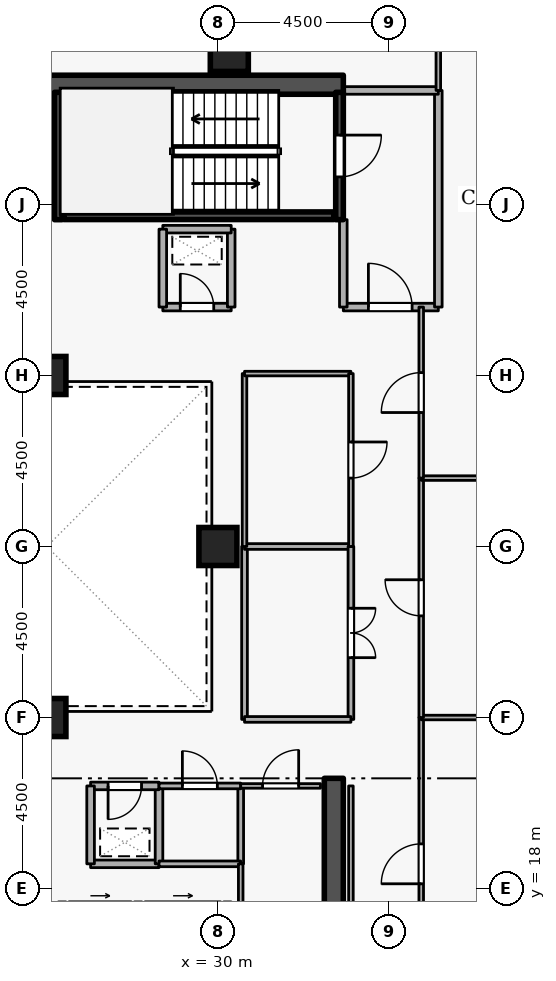
"""IFC4 building model, lengths in metres.
Left out: names, types, materials, properties, quantities, classifications, styles, units other than length and angle.
Written with IfcOpenShell. Run it as: python <this file> out.ifc"""

import sys

from ifc_helpers import new_model, si_unit, direction, frame, frame_2d, origin, origin_2d, place, context, subcontext, project, spatial, rectangle, extrude, element, fill, save


model = new_model("IFC4")
c1 = context("Model", 3, precision=1e-05, world=origin(), true_north=direction((0.0, 1.0)))
c2 = subcontext(c1, "Body", "Model", "MODEL_VIEW")
j1 = project(units=[si_unit("LENGTHUNIT", "METRE"), si_unit("PLANEANGLEUNIT", "RADIAN")], contexts=[c1])
p1 = place(None, origin())
s1 = spatial("IfcSite", under=j1, at=p1, CompositionType="ELEMENT")
p2 = place(p1, origin())
s2 = spatial("IfcBuilding", under=s1, at=p2, CompositionType="ELEMENT")
p3 = place(p2, frame((0.0, 0.0, 243.9)))
s3 = spatial("IfcBuildingStorey", under=s2, at=p3, CompositionType="ELEMENT", Elevation=243.9)
p4 = place(p3, frame((33.05, 15.1, 0.0), z_axis=(0.0, 0.0, 1.0), x_axis=(0.0, 1.0, 0.0)))
e1 = element("IfcWall", 1, at=p4, inside=s3, PredefinedType="SHEAR", context=c2, shape_type="SweptSolid", body=[
    extrude(rectangle(XDim=5.8, YDim=0.5, at=frame_2d((2.9, 0.0))), origin(), (0.0, 0.0, 1.0), 3.6),
])
p5 = place(p3, frame((17.7, 39.15, 0.0), z_axis=(0.0, 0.0, 1.0), x_axis=(1.0, 0.0, 0.0)))
e2 = element("IfcWall", 2, at=p5, inside=s3, PredefinedType="SHEAR", context=c2, shape_type="SweptSolid", body=[
    extrude(rectangle(XDim=15.6, YDim=0.5, at=frame_2d((7.8, 0.0))), origin(), (0.0, 0.0, 1.0), 3.6),
])
for number, where, z_axis, x_axis in (
    (3, (30.3, 40.0, 0.0), (0.0, 0.0, 1.0), (1.0, 0.0, 0.0)),
    (4, (25.5, 22.5, 0.0), (0.0, 0.0, 1.0), (1.0, 0.0, 0.0)),
    (5, (25.5, 31.5, 0.0), (0.0, 0.0, 1.0), (1.0, 0.0, 0.0)),
    (6, (30.0, 27.0, 0.0), (0.0, 0.0, 1.0), (1.0, 0.0, 0.0)),
):
    element("IfcColumn", number, at=place(p3, frame(where, z_axis=z_axis, x_axis=x_axis)), inside=s3, PredefinedType="COLUMN", context=c2, shape_type="SweptSolid", body=[
        extrude(rectangle(XDim=1.0, YDim=1.0, at=origin_2d()), origin(), (0.0, 0.0, 1.0), 3.6),
    ])
p6 = place(p3, frame((26.08, 17.55, 0.0), z_axis=(0.0, 0.0, 1.0), x_axis=(1.0, 0.0, 0.0)))
e7 = element("IfcWall", 7, at=p6, inside=s3, PredefinedType="STANDARD", context=c2, shape_type="SweptSolid", body=[
    extrude(rectangle(XDim=1.64, YDim=0.2, at=frame_2d((0.82, 0.0))), origin(), (0.0, 0.0, 1.0), 3.34),
])
p7 = place(p6, frame((0.31, 0.0, 0.0)))
e8 = element("IfcOpeningElement", 8, at=p7, cuts=e7, PredefinedType="OPENING", context=c2, shape_type="SweptSolid", body=[
    extrude(rectangle(XDim=1.02, YDim=2.06, at=frame_2d((0.51, 1.03))), frame((0.0, 0.11, 0.0), z_axis=(0.0, -1.0, 0.0), x_axis=(1.0, 0.0, 0.0)), (0.0, 0.0, 1.0), 0.22),
])
p8 = place(p3, frame((28.08, 17.55, 0.0), z_axis=(0.0, 0.0, 1.0), x_axis=(1.0, 0.0, 0.0)))
e9 = element("IfcWall", 9, at=p8, inside=s3, PredefinedType="STANDARD", context=c2, shape_type="SweptSolid", body=[
    extrude(rectangle(XDim=1.99, YDim=0.2, at=frame_2d((0.995, 0.0))), origin(), (0.0, 0.0, 1.0), 3.34),
])
p9 = place(p8, frame((0.485, 0.0, 0.0)))
e10 = element("IfcOpeningElement", 10, at=p9, cuts=e9, PredefinedType="OPENING", context=c2, shape_type="SweptSolid", body=[
    extrude(rectangle(XDim=1.02, YDim=2.06, at=frame_2d((0.51, 1.03))), frame((0.0, 0.11, 0.0), z_axis=(0.0, -1.0, 0.0), x_axis=(1.0, 0.0, 0.0)), (0.0, 0.0, 1.0), 0.22),
])
p10 = place(p3, frame((33.2, 38.95, 0.0), z_axis=(0.0, 0.0, 1.0), x_axis=(0.0, -1.0, 0.0)))
e11 = element("IfcWall", 11, at=p10, inside=s3, PredefinedType="SHEAR", context=c2, shape_type="SweptSolid", body=[
    extrude(rectangle(XDim=3.35, YDim=0.2, at=frame_2d((1.675, 0.0))), origin(), (0.0, 0.0, 1.0), 3.6),
])
p11 = place(p10, frame((1.125, 0.0, 0.0)))
e12 = element("IfcOpeningElement", 12, at=p11, cuts=e11, PredefinedType="OPENING", context=c2, shape_type="SweptSolid", body=[
    extrude(rectangle(XDim=1.1, YDim=2.1, at=frame_2d((0.55, 1.05))), frame((0.0, 0.11, 0.0), z_axis=(0.0, -1.0, 0.0), x_axis=(1.0, 0.0, 0.0)), (0.0, 0.0, 1.0), 0.22),
])
p12 = place(p3, frame((25.8, 35.6, 0.0), z_axis=(0.0, 0.0, 1.0), x_axis=(0.0, 1.0, 0.0)))
e13 = element("IfcWall", 13, at=p12, inside=s3, PredefinedType="SHEAR", context=c2, shape_type="SweptSolid", body=[
    extrude(rectangle(XDim=3.35, YDim=0.2, at=frame_2d((1.675, 0.0))), origin(), (0.0, 0.0, 1.0), 3.6),
])
p13 = place(p3, frame((25.95, 35.703, 0.0), z_axis=(0.0, 0.0, 1.0), x_axis=(1.0, 0.0, 0.0)))
e14 = element("IfcWall", 14, at=p13, inside=s3, PredefinedType="SHEAR", context=c2, shape_type="SweptSolid", body=[
    extrude(rectangle(XDim=7.1, YDim=0.2, at=frame_2d((3.55, 0.0))), origin(), (0.0, 0.0, 1.0), 3.6),
])
p14 = place(p3, frame((33.3, 33.3, 0.0), z_axis=(0.0, 0.0, 1.0), x_axis=(1.0, 0.0, 0.0)))
e15 = element("IfcWall", 15, at=p14, inside=s3, PredefinedType="STANDARD", context=c2, shape_type="SweptSolid", body=[
    extrude(rectangle(XDim=2.5, YDim=0.2, at=frame_2d((1.25, 0.0))), origin(), (0.0, 0.0, 1.0), 3.34),
])
p15 = place(p14, frame((0.66, 0.0, 0.0)))
e16 = element("IfcOpeningElement", 16, at=p15, cuts=e15, PredefinedType="OPENING", context=c2, shape_type="SweptSolid", body=[
    extrude(rectangle(XDim=1.15, YDim=2.1, at=frame_2d((0.575, 1.05))), frame((0.0, 0.11, 0.0), z_axis=(0.0, -1.0, 0.0), x_axis=(1.0, 0.0, 0.0)), (0.0, 0.0, 1.0), 0.22),
])
p16 = place(p3, frame((35.8, 33.3, 0.0), z_axis=(0.0, 0.0, 1.0), x_axis=(0.0, 1.0, 0.0)))
e17 = element("IfcWall", 17, at=p16, inside=s3, PredefinedType="STANDARD", context=c2, shape_type="SweptSolid", body=[
    extrude(rectangle(XDim=5.7, YDim=0.2, at=frame_2d((2.85, 0.0))), origin(), (0.0, 0.0, 1.0), 3.34),
])
p17 = place(p3, frame((35.8, 39.0, 0.0), z_axis=(0.0, 0.0, 1.0), x_axis=(-1.0, 0.0, 0.0)))
e18 = element("IfcWall", 18, at=p17, inside=s3, PredefinedType="STANDARD", context=c2, shape_type="SweptSolid", body=[
    extrude(rectangle(XDim=2.5, YDim=0.2, at=frame_2d((1.25, 0.0))), origin(), (0.0, 0.0, 1.0), 3.34),
])
p18 = place(p3, frame((33.3, 35.6, 0.0), z_axis=(0.0, 0.0, 1.0), x_axis=(0.0, -1.0, 0.0)))
e19 = element("IfcWall", 19, at=p18, inside=s3, PredefinedType="STANDARD", context=c2, shape_type="SweptSolid", body=[
    extrude(rectangle(XDim=2.3, YDim=0.2, at=frame_2d((1.15, 0.0))), origin(), (0.0, 0.0, 1.0), 2.545),
])
p19 = place(p3, frame((26.65, 18.65, 0.0), z_axis=(0.0, 0.0, 1.0), x_axis=(1.0, 0.0, 0.0)))
e20 = element("IfcWall", 20, at=p19, inside=s3, PredefinedType="STANDARD", context=c2, shape_type="SweptSolid", body=[
    extrude(rectangle(XDim=1.8, YDim=0.2, at=frame_2d((0.9, 0.0))), origin(), (0.0, 0.0, 1.0), 3.34),
])
p20 = place(p3, frame((28.45, 18.65, 0.0), z_axis=(0.0, 0.0, 1.0), x_axis=(0.0, 1.0, 0.0)))
e21 = element("IfcWall", 21, at=p20, inside=s3, PredefinedType="STANDARD", context=c2, shape_type="SweptSolid", body=[
    extrude(rectangle(XDim=2.05, YDim=0.2, at=frame_2d((1.025, 0.0))), origin(), (0.0, 0.0, 1.0), 3.34),
])
p21 = place(p3, frame((28.45, 20.7, 0.0), z_axis=(0.0, 0.0, 1.0), x_axis=(-1.0, 0.0, 0.0)))
e22 = element("IfcWall", 22, at=p21, inside=s3, PredefinedType="STANDARD", context=c2, shape_type="SweptSolid", body=[
    extrude(rectangle(XDim=1.8, YDim=0.2, at=frame_2d((0.9, 0.0))), origin(), (0.0, 0.0, 1.0), 3.34),
])
p22 = place(p21, frame((0.46, 0.0, 0.0)))
e23 = element("IfcOpeningElement", 23, at=p22, cuts=e22, PredefinedType="OPENING", context=c2, shape_type="SweptSolid", body=[
    extrude(rectangle(XDim=0.88, YDim=2.04, at=frame_2d((0.44, 1.02))), frame((0.0, 0.11, 0.0), z_axis=(0.0, -1.0, 0.0), x_axis=(1.0, 0.0, 0.0)), (0.0, 0.0, 1.0), 0.22),
])
p23 = place(p3, frame((26.65, 20.7, 0.0), z_axis=(0.0, 0.0, 1.0), x_axis=(0.0, -1.0, 0.0)))
e24 = element("IfcWall", 24, at=p23, inside=s3, PredefinedType="STANDARD", context=c2, shape_type="SweptSolid", body=[
    extrude(rectangle(XDim=2.05, YDim=0.2, at=frame_2d((1.025, 0.0))), origin(), (0.0, 0.0, 1.0), 3.34),
])
p24 = place(p3, frame((28.55, 33.3, 0.0), z_axis=(0.0, 0.0, 1.0), x_axis=(1.0, 0.0, 0.0)))
e25 = element("IfcWall", 25, at=p24, inside=s3, PredefinedType="STANDARD", context=c2, shape_type="SweptSolid", body=[
    extrude(rectangle(XDim=1.8, YDim=0.2, at=frame_2d((0.9, 0.0))), origin(), (0.0, 0.0, 1.0), 3.34),
])
p25 = place(p24, frame((0.46, 0.0, 0.0)))
e26 = element("IfcOpeningElement", 26, at=p25, cuts=e25, PredefinedType="OPENING", context=c2, shape_type="SweptSolid", body=[
    extrude(rectangle(XDim=0.88, YDim=2.04, at=frame_2d((0.44, 1.02))), frame((0.0, 0.11, 0.0), z_axis=(0.0, -1.0, 0.0), x_axis=(1.0, 0.0, 0.0)), (0.0, 0.0, 1.0), 0.22),
])
p26 = place(p3, frame((30.35, 33.3, 0.0), z_axis=(0.0, 0.0, 1.0), x_axis=(0.0, 1.0, 0.0)))
e27 = element("IfcWall", 27, at=p26, inside=s3, PredefinedType="STANDARD", context=c2, shape_type="SweptSolid", body=[
    extrude(rectangle(XDim=2.05, YDim=0.2, at=frame_2d((1.025, 0.0))), origin(), (0.0, 0.0, 1.0), 3.34),
])
p27 = place(p3, frame((30.35, 35.35, 0.0), z_axis=(0.0, 0.0, 1.0), x_axis=(-1.0, 0.0, 0.0)))
e28 = element("IfcWall", 28, at=p27, inside=s3, PredefinedType="STANDARD", context=c2, shape_type="SweptSolid", body=[
    extrude(rectangle(XDim=1.8, YDim=0.2, at=frame_2d((0.9, 0.0))), origin(), (0.0, 0.0, 1.0), 3.34),
])
p28 = place(p3, frame((28.55, 35.35, 0.0), z_axis=(0.0, 0.0, 1.0), x_axis=(0.0, -1.0, 0.0)))
e29 = element("IfcWall", 29, at=p28, inside=s3, PredefinedType="STANDARD", context=c2, shape_type="SweptSolid", body=[
    extrude(rectangle(XDim=2.05, YDim=0.2, at=frame_2d((1.025, 0.0))), origin(), (0.0, 0.0, 1.0), 3.34),
])
p29 = place(p3, frame((30.6, 20.7, 0.0), z_axis=(0.0, 0.0, 1.0), x_axis=(0.0, -1.0, 0.0)))
e30 = element("IfcWall", 30, at=p29, inside=s3, PredefinedType="PARTITIONING", context=c2, shape_type="SweptSolid", body=[
    extrude(rectangle(XDim=2.05, YDim=0.15, at=frame_2d((1.025, 0.0))), origin(), (0.0, 0.0, 1.0), 3.34),
])
p30 = place(p3, frame((30.6, 18.65, 0.0), z_axis=(0.0, 0.0, 1.0), x_axis=(-1.0, 0.0, 0.0)))
e31 = element("IfcWall", 31, at=p30, inside=s3, PredefinedType="PARTITIONING", context=c2, shape_type="SweptSolid", body=[
    extrude(rectangle(XDim=2.15, YDim=0.15, at=frame_2d((1.075, 0.0))), origin(), (0.0, 0.0, 1.0), 3.34),
])
p31 = place(p3, frame((28.45, 20.7, 0.0), z_axis=(0.0, 0.0, 1.0), x_axis=(1.0, 0.0, 0.0)))
e32 = element("IfcWall", 32, at=p31, inside=s3, PredefinedType="PARTITIONING", context=c2, shape_type="SweptSolid", body=[
    extrude(rectangle(XDim=2.15, YDim=0.15, at=frame_2d((1.075, 0.0))), origin(), (0.0, 0.0, 1.0), 3.34),
])
p32 = place(p31, frame((0.615, 0.0, 0.0)))
e33 = element("IfcOpeningElement", 33, at=p32, cuts=e32, PredefinedType="OPENING", context=c2, shape_type="SweptSolid", body=[
    extrude(rectangle(XDim=0.92, YDim=2.08, at=frame_2d((0.46, 1.04))), frame((0.0, 0.085, 0.0), z_axis=(0.0, -1.0, 0.0), x_axis=(1.0, 0.0, 0.0)), (0.0, 0.0, 1.0), 0.17),
])
p33 = place(p3, frame((30.6, 15.1, 0.0), z_axis=(0.0, 0.0, 1.0), x_axis=(0.0, 1.0, 0.0)))
e34 = element("IfcWall", 34, at=p33, inside=s3, PredefinedType="PARTITIONING", context=c2, shape_type="SweptSolid", body=[
    extrude(rectangle(XDim=3.55, YDim=0.12, at=frame_2d((1.775, 0.0))), origin(), (0.0, 0.0, 1.0), 3.34),
])
p34 = place(p3, frame((30.6, 20.7, 0.0), z_axis=(0.0, 0.0, 1.0), x_axis=(1.0, 0.0, 0.0)))
e35 = element("IfcWall", 35, at=p34, inside=s3, PredefinedType="PARTITIONING", context=c2, shape_type="SweptSolid", body=[
    extrude(rectangle(XDim=2.1, YDim=0.12, at=frame_2d((1.05, 0.0))), origin(), (0.0, 0.0, 1.0), 3.34),
])
p35 = place(p34, frame((0.575, 0.0, 0.0)))
e36 = element("IfcOpeningElement", 36, at=p35, cuts=e35, PredefinedType="OPENING", context=c2, shape_type="SweptSolid", body=[
    extrude(rectangle(XDim=0.95, YDim=2.1, at=frame_2d((0.475, 1.05))), frame((0.0, 0.07, 0.0), z_axis=(0.0, -1.0, 0.0), x_axis=(1.0, 0.0, 0.0)), (0.0, 0.0, 1.0), 0.14),
])
p36 = place(p3, frame((33.5, 20.7, 0.0), z_axis=(0.0, 0.0, 1.0), x_axis=(0.0, -1.0, 0.0)))
e37 = element("IfcWall", 37, at=p36, inside=s3, PredefinedType="PARTITIONING", context=c2, shape_type="SweptSolid", body=[
    extrude(rectangle(XDim=5.9, YDim=0.12, at=frame_2d((2.95, 0.0))), origin(), (0.0, 0.0, 1.0), 3.34),
])
p37 = place(p3, frame((35.35, 14.8, 0.0), z_axis=(0.0, 0.0, 1.0), x_axis=(0.0, 1.0, 0.0)))
e38 = element("IfcWall", 38, at=p37, inside=s3, PredefinedType="PARTITIONING", context=c2, shape_type="SweptSolid", body=[
    extrude(rectangle(XDim=7.7, YDim=0.12, at=frame_2d((3.85, 0.0))), origin(), (0.0, 0.0, 1.0), 3.34),
])
p38 = place(p37, frame((3.325, 0.0, 0.0)))
e39 = element("IfcOpeningElement", 39, at=p38, cuts=e38, PredefinedType="OPENING", context=c2, shape_type="SweptSolid", body=[
    extrude(rectangle(XDim=1.05, YDim=2.1, at=frame_2d((0.525, 1.05))), frame((0.0, 0.07, 0.0), z_axis=(0.0, -1.0, 0.0), x_axis=(1.0, 0.0, 0.0)), (0.0, 0.0, 1.0), 0.14),
])
p39 = place(p3, frame((35.35, 22.5, 0.0), z_axis=(0.0, 0.0, 1.0), x_axis=(1.0, 0.0, 0.0)))
e40 = element("IfcWall", 40, at=p39, inside=s3, PredefinedType="PARTITIONING", context=c2, shape_type="SweptSolid", body=[
    extrude(rectangle(XDim=7.87, YDim=0.12, at=frame_2d((3.935, 0.0))), origin(), (0.0, 0.0, 1.0), 3.34),
])
p40 = place(p3, frame((35.35, 22.5, 0.0), z_axis=(0.0, 0.0, 1.0), x_axis=(0.0, 1.0, 0.0)))
e41 = element("IfcWall", 41, at=p40, inside=s3, PredefinedType="PARTITIONING", context=c2, shape_type="SweptSolid", body=[
    extrude(rectangle(XDim=6.3, YDim=0.12, at=frame_2d((3.15, 0.0))), origin(), (0.0, 0.0, 1.0), 3.34),
])
p41 = place(p40, frame((2.675, 0.0, 0.0)))
e42 = element("IfcOpeningElement", 42, at=p41, cuts=e41, PredefinedType="OPENING", context=c2, shape_type="SweptSolid", body=[
    extrude(rectangle(XDim=0.95, YDim=2.1, at=frame_2d((0.475, 1.05))), frame((0.0, 0.07, 0.0), z_axis=(0.0, -1.0, 0.0), x_axis=(1.0, 0.0, 0.0)), (0.0, 0.0, 1.0), 0.14),
])
p42 = place(p3, frame((35.35, 28.8, 0.0), z_axis=(0.0, 0.0, 1.0), x_axis=(1.0, 0.0, 0.0)))
e43 = element("IfcWall", 43, at=p42, inside=s3, PredefinedType="PARTITIONING", context=c2, shape_type="SweptSolid", body=[
    extrude(rectangle(XDim=7.87, YDim=0.12, at=frame_2d((3.935, 0.0))), origin(), (0.0, 0.0, 1.0), 3.34),
])
p43 = place(p3, frame((35.8, 39.0, 0.0), z_axis=(0.0, 0.0, 1.0), x_axis=(0.0, 1.0, 0.0)))
e44 = element("IfcWall", 44, at=p43, inside=s3, PredefinedType="PARTITIONING", context=c2, shape_type="SweptSolid", body=[
    extrude(rectangle(XDim=5.72, YDim=0.12, at=frame_2d((2.86, 0.0))), origin(), (0.0, 0.0, 1.0), 3.34),
])
p44 = place(p3, frame((35.35, 28.8, 0.0), z_axis=(0.0, 0.0, 1.0), x_axis=(0.0, 1.0, 0.0)))
e45 = element("IfcWall", 45, at=p44, inside=s3, PredefinedType="PARTITIONING", context=c2, shape_type="SweptSolid", body=[
    extrude(rectangle(XDim=4.5, YDim=0.12, at=frame_2d((2.25, 0.0))), origin(), (0.0, 0.0, 1.0), 3.34),
])
p45 = place(p44, frame((1.725, 0.0, 0.0)))
e46 = element("IfcOpeningElement", 46, at=p45, cuts=e45, PredefinedType="OPENING", context=c2, shape_type="SweptSolid", body=[
    extrude(rectangle(XDim=1.05, YDim=2.1, at=frame_2d((0.525, 1.05))), frame((0.0, 0.07, 0.0), z_axis=(0.0, -1.0, 0.0), x_axis=(1.0, 0.0, 0.0)), (0.0, 0.0, 1.0), 0.14),
])
p46 = place(p3, frame((30.7, 22.45, 0.0), z_axis=(0.0, 0.0, 1.0), x_axis=(0.0, 1.0, 0.0)))
e47 = element("IfcWall", 47, at=p46, inside=s3, PredefinedType="PARTITIONING", context=c2, shape_type="SweptSolid", body=[
    extrude(rectangle(XDim=4.55, YDim=0.15, at=frame_2d((2.275, 0.0))), origin(), (0.0, 0.0, 1.0), 3.34),
])
p47 = place(p3, frame((30.7, 27.0, 0.0), z_axis=(0.0, 0.0, 1.0), x_axis=(1.0, 0.0, 0.0)))
e48 = element("IfcWall", 48, at=p47, inside=s3, PredefinedType="PARTITIONING", context=c2, shape_type="SweptSolid", body=[
    extrude(rectangle(XDim=2.8, YDim=0.15, at=frame_2d((1.4, 0.0))), origin(), (0.0, 0.0, 1.0), 2.878),
])
p48 = place(p3, frame((33.5, 27.0, 0.0), z_axis=(0.0, 0.0, 1.0), x_axis=(0.0, -1.0, 0.0)))
e49 = element("IfcWall", 49, at=p48, inside=s3, PredefinedType="PARTITIONING", context=c2, shape_type="SweptSolid", body=[
    extrude(rectangle(XDim=4.55, YDim=0.15, at=frame_2d((2.275, 0.0))), origin(), (0.0, 0.0, 1.0), 3.34),
])
p49 = place(p48, frame((1.625, 0.0, 0.0)))
e50 = element("IfcOpeningElement", 50, at=p49, cuts=e49, PredefinedType="OPENING", context=c2, shape_type="SweptSolid", body=[
    extrude(rectangle(XDim=1.3, YDim=2.12, at=frame_2d((0.65, 1.06))), frame((0.0, 0.085, 0.0), z_axis=(0.0, -1.0, 0.0), x_axis=(1.0, 0.0, 0.0)), (0.0, 0.0, 1.0), 0.17),
])
p50 = place(p3, frame((33.5, 22.45, 0.0), z_axis=(0.0, 0.0, 1.0), x_axis=(-1.0, 0.0, 0.0)))
e51 = element("IfcWall", 51, at=p50, inside=s3, PredefinedType="PARTITIONING", context=c2, shape_type="SweptSolid", body=[
    extrude(rectangle(XDim=2.8, YDim=0.15, at=frame_2d((1.4, 0.0))), origin(), (0.0, 0.0, 1.0), 3.34),
])
p51 = place(p3, frame((30.7, 27.0, 0.0), z_axis=(0.0, 0.0, 1.0), x_axis=(0.0, 1.0, 0.0)))
e52 = element("IfcWall", 52, at=p51, inside=s3, PredefinedType="PARTITIONING", context=c2, shape_type="SweptSolid", body=[
    extrude(rectangle(XDim=4.55, YDim=0.12, at=frame_2d((2.275, 0.0))), origin(), (0.0, 0.0, 1.0), 3.34),
])
p52 = place(p3, frame((30.7, 31.55, 0.0), z_axis=(0.0, 0.0, 1.0), x_axis=(1.0, 0.0, 0.0)))
e53 = element("IfcWall", 53, at=p52, inside=s3, PredefinedType="PARTITIONING", context=c2, shape_type="SweptSolid", body=[
    extrude(rectangle(XDim=2.8, YDim=0.12, at=frame_2d((1.4, 0.0))), origin(), (0.0, 0.0, 1.0), 3.34),
])
p53 = place(p3, frame((33.5, 31.55, 0.0), z_axis=(0.0, 0.0, 1.0), x_axis=(0.0, -1.0, 0.0)))
e54 = element("IfcWall", 54, at=p53, inside=s3, PredefinedType="PARTITIONING", context=c2, shape_type="SweptSolid", body=[
    extrude(rectangle(XDim=4.55, YDim=0.12, at=frame_2d((2.275, 0.0))), origin(), (0.0, 0.0, 1.0), 3.34),
])
p54 = place(p53, frame((1.8, 0.0, 0.0)))
e55 = element("IfcOpeningElement", 55, at=p54, cuts=e54, PredefinedType="OPENING", context=c2, shape_type="SweptSolid", body=[
    extrude(rectangle(XDim=0.95, YDim=2.1, at=frame_2d((0.475, 1.05))), frame((0.0, 0.07, 0.0), z_axis=(0.0, -1.0, 0.0), x_axis=(1.0, 0.0, 0.0)), (0.0, 0.0, 1.0), 0.14),
])
p55 = place(p11, origin())
e56 = element("IfcDoor", 56, at=p55, inside=s3, OperationType="SINGLE_SWING_LEFT", PredefinedType="DOOR", context=c2, shape_type="SweptSolid", body=[
    extrude(rectangle(XDim=1.1, YDim=2.1, at=frame_2d((0.55, 1.05))), frame((0.0, 0.025, 0.0), z_axis=(0.0, -1.0, 0.0), x_axis=(1.0, 0.0, 0.0)), (0.0, 0.0, 1.0), 0.05),
])
fill(e12, e56)
p56 = place(p15, origin())
e57 = element("IfcDoor", 57, at=p56, inside=s3, OperationType="SINGLE_SWING_LEFT", PredefinedType="DOOR", context=c2, shape_type="SweptSolid", body=[
    extrude(rectangle(XDim=1.15, YDim=2.1, at=frame_2d((0.575, 1.05))), frame((0.0, 0.025, 0.0), z_axis=(0.0, -1.0, 0.0), x_axis=(1.0, 0.0, 0.0)), (0.0, 0.0, 1.0), 0.05),
])
fill(e16, e57)
p57 = place(p22, origin())
e58 = element("IfcDoor", 58, at=p57, inside=s3, OperationType="SINGLE_SWING_RIGHT", PredefinedType="DOOR", context=c2, shape_type="SweptSolid", body=[
    extrude(rectangle(XDim=0.88, YDim=2.04, at=frame_2d((0.44, 1.02))), frame((0.0, 0.025, 0.0), z_axis=(0.0, -1.0, 0.0), x_axis=(1.0, 0.0, 0.0)), (0.0, 0.0, 1.0), 0.05),
])
fill(e23, e58)
p58 = place(p25, origin())
e59 = element("IfcDoor", 59, at=p58, inside=s3, OperationType="SINGLE_SWING_LEFT", PredefinedType="DOOR", context=c2, shape_type="SweptSolid", body=[
    extrude(rectangle(XDim=0.88, YDim=2.04, at=frame_2d((0.44, 1.02))), frame((0.0, 0.025, 0.0), z_axis=(0.0, -1.0, 0.0), x_axis=(1.0, 0.0, 0.0)), (0.0, 0.0, 1.0), 0.05),
])
fill(e26, e59)
p59 = place(p32, origin())
e60 = element("IfcDoor", 60, at=p59, inside=s3, OperationType="SINGLE_SWING_LEFT", PredefinedType="DOOR", context=c2, shape_type="SweptSolid", body=[
    extrude(rectangle(XDim=0.92, YDim=2.08, at=frame_2d((0.46, 1.04))), frame((0.0, 0.025, 0.0), z_axis=(0.0, -1.0, 0.0), x_axis=(1.0, 0.0, 0.0)), (0.0, 0.0, 1.0), 0.05),
])
fill(e33, e60)
p60 = place(p35, origin())
e61 = element("IfcDoor", 61, at=p60, inside=s3, OperationType="SINGLE_SWING_RIGHT", PredefinedType="DOOR", context=c2, shape_type="SweptSolid", body=[
    extrude(rectangle(XDim=0.95, YDim=2.1, at=frame_2d((0.475, 1.05))), frame((0.0, 0.025, 0.0), z_axis=(0.0, -1.0, 0.0), x_axis=(1.0, 0.0, 0.0)), (0.0, 0.0, 1.0), 0.05),
])
fill(e36, e61)
p61 = place(p38, origin())
e62 = element("IfcDoor", 62, at=p61, inside=s3, OperationType="SINGLE_SWING_LEFT", PredefinedType="DOOR", context=c2, shape_type="SweptSolid", body=[
    extrude(rectangle(XDim=1.05, YDim=2.1, at=frame_2d((0.525, 1.05))), frame((0.0, 0.025, 0.0), z_axis=(0.0, -1.0, 0.0), x_axis=(1.0, 0.0, 0.0)), (0.0, 0.0, 1.0), 0.05),
])
fill(e39, e62)
p62 = place(p41, origin())
e63 = element("IfcDoor", 63, at=p62, inside=s3, OperationType="SINGLE_SWING_RIGHT", PredefinedType="DOOR", context=c2, shape_type="SweptSolid", body=[
    extrude(rectangle(XDim=0.95, YDim=2.1, at=frame_2d((0.475, 1.05))), frame((0.0, 0.025, 0.0), z_axis=(0.0, -1.0, 0.0), x_axis=(1.0, 0.0, 0.0)), (0.0, 0.0, 1.0), 0.05),
])
fill(e42, e63)
p63 = place(p45, origin())
e64 = element("IfcDoor", 64, at=p63, inside=s3, OperationType="SINGLE_SWING_LEFT", PredefinedType="DOOR", context=c2, shape_type="SweptSolid", body=[
    extrude(rectangle(XDim=1.05, YDim=2.1, at=frame_2d((0.525, 1.05))), frame((0.0, 0.025, 0.0), z_axis=(0.0, -1.0, 0.0), x_axis=(1.0, 0.0, 0.0)), (0.0, 0.0, 1.0), 0.05),
])
fill(e46, e64)
p64 = place(p49, origin())
e65 = element("IfcDoor", 65, at=p64, inside=s3, OperationType="DOUBLE_DOOR_SINGLE_SWING", PredefinedType="DOOR", context=c2, shape_type="SweptSolid", body=[
    extrude(rectangle(XDim=1.3, YDim=2.12, at=frame_2d((0.65, 1.06))), frame((0.0, 0.025, 0.0), z_axis=(0.0, -1.0, 0.0), x_axis=(1.0, 0.0, 0.0)), (0.0, 0.0, 1.0), 0.05),
])
fill(e50, e65)
p65 = place(p54, origin())
e66 = element("IfcDoor", 66, at=p65, inside=s3, OperationType="SINGLE_SWING_LEFT", PredefinedType="DOOR", context=c2, shape_type="SweptSolid", body=[
    extrude(rectangle(XDim=0.95, YDim=2.1, at=frame_2d((0.475, 1.05))), frame((0.0, 0.025, 0.0), z_axis=(0.0, -1.0, 0.0), x_axis=(1.0, 0.0, 0.0)), (0.0, 0.0, 1.0), 0.05),
])
fill(e55, e66)
save(model, sys.argv[1])
